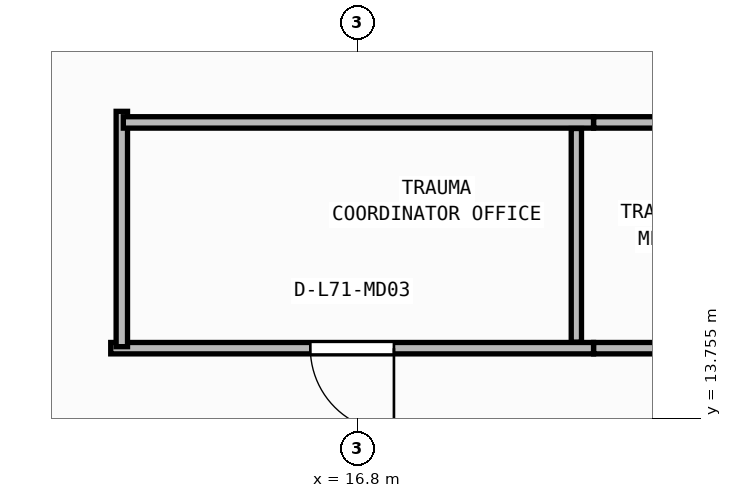
"""IFC4 building model, lengths in metres.
Left out: names, types, materials, properties, quantities, classifications, styles, units other than length and angle.
Written with IfcOpenShell. Run it as: python <this file> out.ifc"""

import sys

from ifc_helpers import new_model, si_unit, direction, frame, frame_2d, origin, place, context, subcontext, project, spatial, rectangle, extrude, element, fill, save


model = new_model("IFC4")
c1 = context("Model", 3, precision=1e-05, world=origin(), true_north=direction((0.0, 1.0)))
c2 = subcontext(c1, "Body", "Model", "MODEL_VIEW")
j1 = project(units=[si_unit("LENGTHUNIT", "METRE"), si_unit("PLANEANGLEUNIT", "RADIAN")], contexts=[c1])
p1 = place(None, origin())
s1 = spatial("IfcSite", under=j1, at=p1, CompositionType="ELEMENT")
p2 = place(p1, origin())
s2 = spatial("IfcBuilding", under=s1, at=p2, CompositionType="ELEMENT")
p3 = place(p2, frame((0.0, 0.0, 288.15)))
s3 = spatial("IfcBuildingStorey", under=s2, at=p3, CompositionType="ELEMENT", Elevation=288.15)
p4 = place(p3, frame((19.906, 14.68, 0.0), z_axis=(0.0, 0.0, 1.0), x_axis=(-1.0, 0.0, 0.0)))
e1 = element("IfcWall", 1, at=p4, inside=s3, PredefinedType="PARTITIONING", context=c2, shape_type="SweptSolid", body=[
    extrude(rectangle(XDim=6.352, YDim=0.15, at=frame_2d((3.176, 0.0))), origin(), (0.0, 0.0, 1.0), 3.71),
])
p5 = place(p4, frame((2.626, 0.0, 0.0)))
e2 = element("IfcOpeningElement", 2, at=p5, cuts=e1, PredefinedType="OPENING", context=c2, shape_type="SweptSolid", body=[
    extrude(rectangle(XDim=1.1, YDim=2.1, at=frame_2d((0.55, 1.05))), frame((0.0, 0.085, 0.0), z_axis=(0.0, -1.0, 0.0), x_axis=(1.0, 0.0, 0.0)), (0.0, 0.0, 1.0), 0.17),
])
p6 = place(p3, frame((27.136, 14.68, 0.0), z_axis=(0.0, 0.0, 1.0), x_axis=(-1.0, 0.0, 0.0)))
e3 = element("IfcWall", 3, at=p6, inside=s3, PredefinedType="PARTITIONING", context=c2, shape_type="SweptSolid", body=[
    extrude(rectangle(XDim=7.228, YDim=0.15, at=frame_2d((3.614, 0.0))), origin(), (0.0, 0.0, 1.0), 3.71),
])
p7 = place(p6, frame((3.064, 0.0, 0.0)))
e4 = element("IfcOpeningElement", 4, at=p7, cuts=e3, PredefinedType="OPENING", context=c2, shape_type="SweptSolid", body=[
    extrude(rectangle(XDim=1.1, YDim=2.1, at=frame_2d((0.55, 1.05))), frame((0.0, 0.085, 0.0), z_axis=(0.0, -1.0, 0.0), x_axis=(1.0, 0.0, 0.0)), (0.0, 0.0, 1.0), 0.17),
])
p8 = place(p3, frame((13.7, 14.7, 0.0), z_axis=(0.0, 0.0, 1.0), x_axis=(0.0, 1.0, 0.0)))
e5 = element("IfcWall", 5, at=p8, inside=s3, PredefinedType="PARTITIONING", context=c2, shape_type="SweptSolid", body=[
    extrude(rectangle(XDim=3.096, YDim=0.15, at=frame_2d((1.548, 0.0))), origin(), (0.0, 0.0, 1.0), 3.71),
])
p9 = place(p3, frame((13.72, 17.65, 0.0), z_axis=(0.0, 0.0, 1.0), x_axis=(1.0, 0.0, 0.0)))
e6 = element("IfcWall", 6, at=p9, inside=s3, PredefinedType="PARTITIONING", context=c2, shape_type="SweptSolid", body=[
    extrude(rectangle(XDim=6.186, YDim=0.15, at=frame_2d((3.093, 0.0))), origin(), (0.0, 0.0, 1.0), 3.71),
])
p10 = place(p3, frame((19.908, 17.65, 0.0), z_axis=(0.0, 0.0, 1.0), x_axis=(1.0, 0.0, 0.0)))
e7 = element("IfcWall", 7, at=p10, inside=s3, PredefinedType="PARTITIONING", context=c2, shape_type="SweptSolid", body=[
    extrude(rectangle(XDim=7.228, YDim=0.15, at=frame_2d((3.614, 0.0))), origin(), (0.0, 0.0, 1.0), 3.71),
])
p11 = place(p3, frame((19.68, 14.76, 0.0), z_axis=(0.0, 0.0, 1.0), x_axis=(0.0, 1.0, 0.0)))
e8 = element("IfcWall", 8, at=p11, inside=s3, PredefinedType="PARTITIONING", context=c2, shape_type="SweptSolid", body=[
    extrude(rectangle(XDim=2.81, YDim=0.135, at=frame_2d((1.405, 0.0))), origin(), (0.0, 0.0, 1.0), 3.71),
])
p12 = place(p5, origin())
e9 = element("IfcDoor", 9, at=p12, inside=s3, OperationType="SINGLE_SWING_LEFT", PredefinedType="DOOR", context=c2, shape_type="SweptSolid", body=[
    extrude(rectangle(XDim=1.1, YDim=2.1, at=frame_2d((0.55, 1.05))), frame((0.0, 0.025, 0.0), z_axis=(0.0, -1.0, 0.0), x_axis=(1.0, 0.0, 0.0)), (0.0, 0.0, 1.0), 0.05),
])
fill(e2, e9)
save(model, sys.argv[1])
